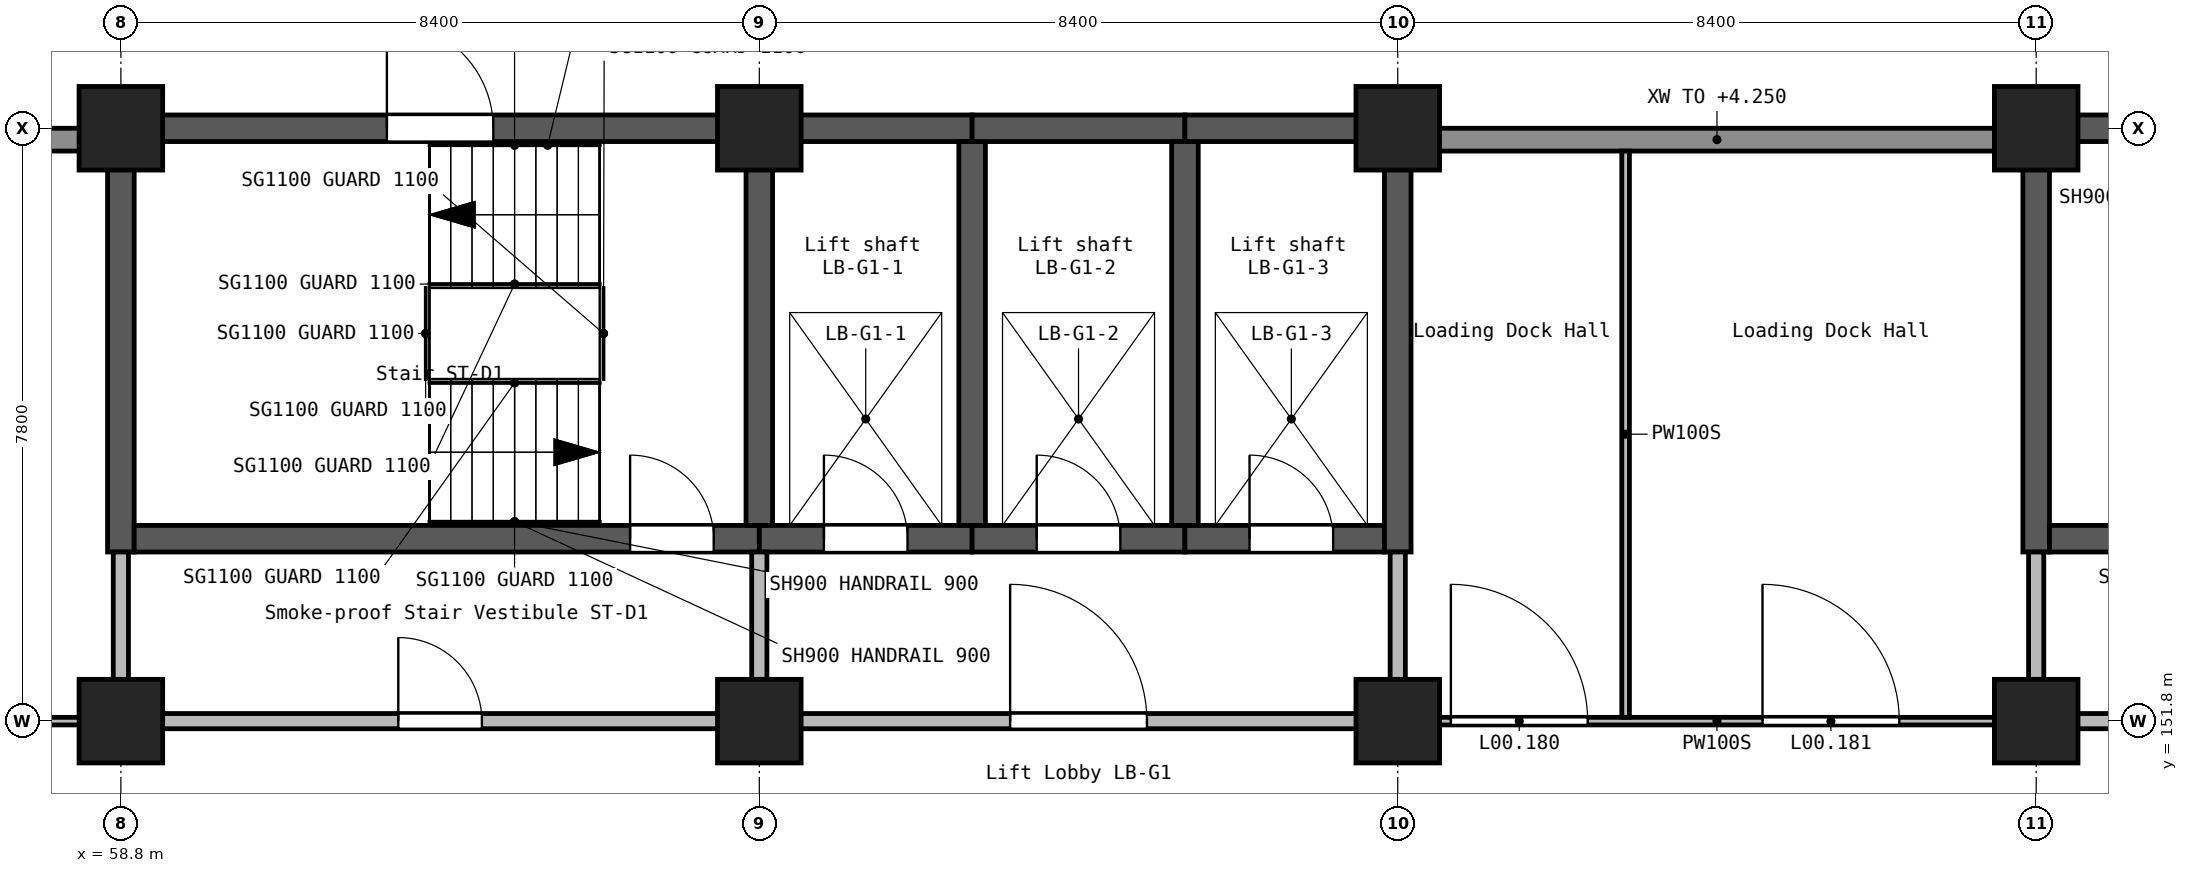
"""IFC4 building model, lengths in metres.
Left out: names, types, materials, properties, quantities, classifications, styles, units other than length and angle.
Written with IfcOpenShell. Run it as: python <this file> out.ifc"""

import sys

from ifc_helpers import new_model, si_unit, direction, frame, frame_2d, origin, origin_2d, place, context, subcontext, project, spatial, rectangle, extrude, element, fill, save


model = new_model("IFC4")
c1 = context("Model", 3, precision=1e-05, world=origin(), true_north=direction((0.0, 1.0)))
c2 = subcontext(c1, "Body", "Model", "MODEL_VIEW")
j1 = project(units=[si_unit("LENGTHUNIT", "METRE"), si_unit("PLANEANGLEUNIT", "RADIAN")], contexts=[c1])
p1 = place(None, origin())
s1 = spatial("IfcSite", under=j1, at=p1, CompositionType="ELEMENT")
p2 = place(p1, origin())
s2 = spatial("IfcBuilding", under=s1, at=p2, CompositionType="ELEMENT")
p3 = place(p2, origin())
s3 = spatial("IfcBuildingStorey", under=s2, at=p3, CompositionType="ELEMENT", Elevation=0.0)
for number, where, z_axis, x_axis in (
    (1, (58.8, 151.8, -0.3), (0.0, 0.0, 1.0), (1.0, 0.0, 0.0)),
    (2, (58.8, 159.6, -0.3), (0.0, 0.0, 1.0), (1.0, 0.0, 0.0)),
    (3, (67.2, 151.8, -0.3), (0.0, 0.0, 1.0), (1.0, 0.0, 0.0)),
    (4, (67.2, 159.6, -0.3), (0.0, 0.0, 1.0), (1.0, 0.0, 0.0)),
    (5, (75.6, 151.8, -0.3), (0.0, 0.0, 1.0), (1.0, 0.0, 0.0)),
    (6, (75.6, 159.6, -0.3), (0.0, 0.0, 1.0), (1.0, 0.0, 0.0)),
    (7, (84.0, 151.8, -0.3), (0.0, 0.0, 1.0), (1.0, 0.0, 0.0)),
    (8, (84.0, 159.6, -0.3), (0.0, 0.0, 1.0), (1.0, 0.0, 0.0)),
):
    element("IfcColumn", number, at=place(p3, frame(where, z_axis=z_axis, x_axis=x_axis)), inside=s3, PredefinedType="COLUMN", context=c2, shape_type="SweptSolid", body=[
        extrude(rectangle(XDim=1.1, YDim=1.1, at=origin_2d()), origin(), (0.0, 0.0, 1.0), 5.7),
    ])
p4 = place(p3, frame((58.625, 159.6, -0.3), z_axis=(0.0, 0.0, 1.0), x_axis=(1.0, 0.0, 0.0)))
e9 = element("IfcWall", 9, at=p4, inside=s3, PredefinedType="SHEAR", context=c2, shape_type="SweptSolid", body=[
    extrude(rectangle(XDim=8.575, YDim=0.35, at=frame_2d((4.288, 0.0))), origin(), (0.0, 0.0, 1.0), 5.7),
])
p5 = place(p4, frame((3.675, 0.0, 0.3)))
e10 = element("IfcOpeningElement", 10, at=p5, cuts=e9, PredefinedType="OPENING", context=c2, shape_type="SweptSolid", body=[
    extrude(rectangle(XDim=1.4, YDim=2.1, at=frame_2d((0.7, 1.05))), frame((0.0, 0.185, 0.0), z_axis=(0.0, -1.0, 0.0), x_axis=(1.0, 0.0, 0.0)), (0.0, 0.0, 1.0), 0.37),
])
p6 = place(p3, frame((58.8, 154.025, -0.3), z_axis=(0.0, 0.0, 1.0), x_axis=(0.0, 1.0, 0.0)))
e11 = element("IfcWall", 11, at=p6, inside=s3, PredefinedType="SHEAR", context=c2, shape_type="SweptSolid", body=[
    extrude(rectangle(XDim=5.4, YDim=0.35, at=frame_2d((2.7, 0.0))), origin(), (0.0, 0.0, 1.0), 5.7),
])
p7 = place(p3, frame((58.975, 154.2, -0.3), z_axis=(0.0, 0.0, 1.0), x_axis=(1.0, 0.0, 0.0)))
e12 = element("IfcWall", 12, at=p7, inside=s3, PredefinedType="SHEAR", context=c2, shape_type="SweptSolid", body=[
    extrude(rectangle(XDim=8.225, YDim=0.35, at=frame_2d((4.112, 0.0))), origin(), (0.0, 0.0, 1.0), 5.7),
])
p8 = place(p7, frame((6.525, 0.0, 0.3)))
e13 = element("IfcOpeningElement", 13, at=p8, cuts=e12, PredefinedType="OPENING", context=c2, shape_type="SweptSolid", body=[
    extrude(rectangle(XDim=1.1, YDim=2.1, at=frame_2d((0.55, 1.05))), frame((0.0, 0.185, 0.0), z_axis=(0.0, -1.0, 0.0), x_axis=(1.0, 0.0, 0.0)), (0.0, 0.0, 1.0), 0.37),
])
p9 = place(p3, frame((67.2, 154.2, -0.3), z_axis=(0.0, 0.0, 1.0), x_axis=(1.0, 0.0, 0.0)))
e14 = element("IfcWall", 14, at=p9, inside=s3, PredefinedType="SHEAR", context=c2, shape_type="SweptSolid", body=[
    extrude(rectangle(XDim=2.8, YDim=0.35, at=frame_2d((1.4, 0.0))), origin(), (0.0, 0.0, 1.0), 5.7),
])
p10 = place(p9, frame((0.85, 0.0, 0.3)))
e15 = element("IfcOpeningElement", 15, at=p10, cuts=e14, PredefinedType="OPENING", context=c2, shape_type="SweptSolid", body=[
    extrude(rectangle(XDim=1.1, YDim=2.1, at=frame_2d((0.55, 1.05))), frame((0.0, 0.185, 0.0), z_axis=(0.0, -1.0, 0.0), x_axis=(1.0, 0.0, 0.0)), (0.0, 0.0, 1.0), 0.37),
])
p11 = place(p3, frame((67.2, 154.375, -0.3), z_axis=(0.0, 0.0, 1.0), x_axis=(0.0, 1.0, 0.0)))
e16 = element("IfcWall", 16, at=p11, inside=s3, PredefinedType="SHEAR", context=c2, shape_type="SweptSolid", body=[
    extrude(rectangle(XDim=5.05, YDim=0.35, at=frame_2d((2.525, 0.0))), origin(), (0.0, 0.0, 1.0), 5.7),
])
p12 = place(p3, frame((67.2, 159.6, -0.3), z_axis=(0.0, 0.0, 1.0), x_axis=(1.0, 0.0, 0.0)))
e17 = element("IfcWall", 17, at=p12, inside=s3, PredefinedType="SHEAR", context=c2, shape_type="SweptSolid", body=[
    extrude(rectangle(XDim=2.8, YDim=0.35, at=frame_2d((1.4, 0.0))), origin(), (0.0, 0.0, 1.0), 5.7),
])
p13 = place(p3, frame((70.0, 154.2, -0.3), z_axis=(0.0, 0.0, 1.0), x_axis=(1.0, 0.0, 0.0)))
e18 = element("IfcWall", 18, at=p13, inside=s3, PredefinedType="SHEAR", context=c2, shape_type="SweptSolid", body=[
    extrude(rectangle(XDim=2.8, YDim=0.35, at=frame_2d((1.4, 0.0))), origin(), (0.0, 0.0, 1.0), 5.7),
])
p14 = place(p13, frame((0.85, 0.0, 0.3)))
e19 = element("IfcOpeningElement", 19, at=p14, cuts=e18, PredefinedType="OPENING", context=c2, shape_type="SweptSolid", body=[
    extrude(rectangle(XDim=1.1, YDim=2.1, at=frame_2d((0.55, 1.05))), frame((0.0, 0.185, 0.0), z_axis=(0.0, -1.0, 0.0), x_axis=(1.0, 0.0, 0.0)), (0.0, 0.0, 1.0), 0.37),
])
p15 = place(p3, frame((70.0, 154.375, -0.3), z_axis=(0.0, 0.0, 1.0), x_axis=(0.0, 1.0, 0.0)))
e20 = element("IfcWall", 20, at=p15, inside=s3, PredefinedType="SHEAR", context=c2, shape_type="SweptSolid", body=[
    extrude(rectangle(XDim=5.05, YDim=0.35, at=frame_2d((2.525, 0.0))), origin(), (0.0, 0.0, 1.0), 5.7),
])
p16 = place(p3, frame((70.0, 159.6, -0.3), z_axis=(0.0, 0.0, 1.0), x_axis=(1.0, 0.0, 0.0)))
e21 = element("IfcWall", 21, at=p16, inside=s3, PredefinedType="SHEAR", context=c2, shape_type="SweptSolid", body=[
    extrude(rectangle(XDim=2.8, YDim=0.35, at=frame_2d((1.4, 0.0))), origin(), (0.0, 0.0, 1.0), 5.7),
])
p17 = place(p3, frame((72.8, 154.2, -0.3), z_axis=(0.0, 0.0, 1.0), x_axis=(1.0, 0.0, 0.0)))
e22 = element("IfcWall", 22, at=p17, inside=s3, PredefinedType="SHEAR", context=c2, shape_type="SweptSolid", body=[
    extrude(rectangle(XDim=2.625, YDim=0.35, at=frame_2d((1.312, 0.0))), origin(), (0.0, 0.0, 1.0), 5.7),
])
p18 = place(p17, frame((0.85, 0.0, 0.3)))
e23 = element("IfcOpeningElement", 23, at=p18, cuts=e22, PredefinedType="OPENING", context=c2, shape_type="SweptSolid", body=[
    extrude(rectangle(XDim=1.1, YDim=2.1, at=frame_2d((0.55, 1.05))), frame((0.0, 0.185, 0.0), z_axis=(0.0, -1.0, 0.0), x_axis=(1.0, 0.0, 0.0)), (0.0, 0.0, 1.0), 0.37),
])
p19 = place(p3, frame((72.8, 154.375, -0.3), z_axis=(0.0, 0.0, 1.0), x_axis=(0.0, 1.0, 0.0)))
e24 = element("IfcWall", 24, at=p19, inside=s3, PredefinedType="SHEAR", context=c2, shape_type="SweptSolid", body=[
    extrude(rectangle(XDim=5.05, YDim=0.35, at=frame_2d((2.525, 0.0))), origin(), (0.0, 0.0, 1.0), 5.7),
])
p20 = place(p3, frame((72.8, 159.6, -0.3), z_axis=(0.0, 0.0, 1.0), x_axis=(1.0, 0.0, 0.0)))
e25 = element("IfcWall", 25, at=p20, inside=s3, PredefinedType="SHEAR", context=c2, shape_type="SweptSolid", body=[
    extrude(rectangle(XDim=2.625, YDim=0.35, at=frame_2d((1.312, 0.0))), origin(), (0.0, 0.0, 1.0), 5.7),
])
p21 = place(p3, frame((75.6, 154.025, -0.3), z_axis=(0.0, 0.0, 1.0), x_axis=(0.0, 1.0, 0.0)))
e26 = element("IfcWall", 26, at=p21, inside=s3, PredefinedType="SHEAR", context=c2, shape_type="SweptSolid", body=[
    extrude(rectangle(XDim=5.75, YDim=0.35, at=frame_2d((2.875, 0.0))), origin(), (0.0, 0.0, 1.0), 5.7),
])
p22 = place(p3, frame((83.825, 159.6, -0.3), z_axis=(0.0, 0.0, 1.0), x_axis=(1.0, 0.0, 0.0)))
e27 = element("IfcWall", 27, at=p22, inside=s3, PredefinedType="SHEAR", context=c2, shape_type="SweptSolid", body=[
    extrude(rectangle(XDim=8.4, YDim=0.35, at=frame_2d((4.2, 0.0))), origin(), (0.0, 0.0, 1.0), 5.7),
])
p23 = place(p22, frame((3.675, 0.0, 0.3)))
e28 = element("IfcOpeningElement", 28, at=p23, cuts=e27, PredefinedType="OPENING", context=c2, shape_type="SweptSolid", body=[
    extrude(rectangle(XDim=1.4, YDim=2.1, at=frame_2d((0.7, 1.05))), frame((0.0, 0.185, 0.0), z_axis=(0.0, -1.0, 0.0), x_axis=(1.0, 0.0, 0.0)), (0.0, 0.0, 1.0), 0.37),
])
p24 = place(p3, frame((84.0, 154.025, -0.3), z_axis=(0.0, 0.0, 1.0), x_axis=(0.0, 1.0, 0.0)))
e29 = element("IfcWall", 29, at=p24, inside=s3, PredefinedType="SHEAR", context=c2, shape_type="SweptSolid", body=[
    extrude(rectangle(XDim=5.4, YDim=0.35, at=frame_2d((2.7, 0.0))), origin(), (0.0, 0.0, 1.0), 5.7),
])
p25 = place(p3, frame((84.175, 154.2, -0.3), z_axis=(0.0, 0.0, 1.0), x_axis=(1.0, 0.0, 0.0)))
e30 = element("IfcWall", 30, at=p25, inside=s3, PredefinedType="SHEAR", context=c2, shape_type="SweptSolid", body=[
    extrude(rectangle(XDim=8.05, YDim=0.35, at=frame_2d((4.025, 0.0))), origin(), (0.0, 0.0, 1.0), 5.7),
])
p26 = place(p25, frame((6.525, 0.0, 0.3)))
e31 = element("IfcOpeningElement", 31, at=p26, cuts=e30, PredefinedType="OPENING", context=c2, shape_type="SweptSolid", body=[
    extrude(rectangle(XDim=1.1, YDim=2.1, at=frame_2d((0.55, 1.05))), frame((0.0, 0.185, 0.0), z_axis=(0.0, -1.0, 0.0), x_axis=(1.0, 0.0, 0.0)), (0.0, 0.0, 1.0), 0.37),
])
p27 = place(p3, frame((83.5, 159.45, 0.0), z_axis=(0.0, 0.0, 1.0), x_axis=(-1.0, 0.0, 0.0)))
e32 = element("IfcWall", 32, at=p27, inside=s3, PredefinedType="STANDARD", context=c2, shape_type="SweptSolid", body=[
    extrude(rectangle(XDim=7.4, YDim=0.3, at=frame_2d((3.7, 0.0))), origin(), (0.0, 0.0, 1.0), 4.25),
])
p28 = place(p3, frame((58.3, 159.45, 0.0), z_axis=(0.0, 0.0, 1.0), x_axis=(-1.0, 0.0, 0.0)))
e33 = element("IfcWall", 33, at=p28, inside=s3, PredefinedType="STANDARD", context=c2, shape_type="SweptSolid", body=[
    extrude(rectangle(XDim=7.4, YDim=0.3, at=frame_2d((3.7, 0.0))), origin(), (0.0, 0.0, 1.0), 4.25),
])
p29 = place(p3, frame((59.3, 151.8, 0.0), z_axis=(0.0, 0.0, 1.0), x_axis=(1.0, 0.0, 0.0)))
e34 = element("IfcWall", 34, at=p29, inside=s3, PredefinedType="SOLIDWALL", context=c2, shape_type="SweptSolid", body=[
    extrude(rectangle(XDim=7.4, YDim=0.2, at=frame_2d((3.7, 0.0))), origin(), (0.0, 0.0, 1.0), 5.05),
])
p30 = place(p29, frame((3.15, 0.0, 0.0)))
e35 = element("IfcOpeningElement", 35, at=p30, cuts=e34, PredefinedType="OPENING", context=c2, shape_type="SweptSolid", body=[
    extrude(rectangle(XDim=1.1, YDim=2.1, at=frame_2d((0.55, 1.05))), frame((0.0, 0.11, 0.0), z_axis=(0.0, -1.0, 0.0), x_axis=(1.0, 0.0, 0.0)), (0.0, 0.0, 1.0), 0.22),
])
p31 = place(p3, frame((67.7, 151.8, 0.0), z_axis=(0.0, 0.0, 1.0), x_axis=(1.0, 0.0, 0.0)))
e36 = element("IfcWall", 36, at=p31, inside=s3, PredefinedType="SOLIDWALL", context=c2, shape_type="SweptSolid", body=[
    extrude(rectangle(XDim=7.4, YDim=0.2, at=frame_2d((3.7, 0.0))), origin(), (0.0, 0.0, 1.0), 5.05),
])
p32 = place(p31, frame((2.8, 0.0, 0.0)))
e37 = element("IfcOpeningElement", 37, at=p32, cuts=e36, PredefinedType="OPENING", context=c2, shape_type="SweptSolid", body=[
    extrude(rectangle(XDim=1.8, YDim=2.1, at=frame_2d((0.9, 1.05))), frame((0.0, 0.11, 0.0), z_axis=(0.0, -1.0, 0.0), x_axis=(1.0, 0.0, 0.0)), (0.0, 0.0, 1.0), 0.22),
])
p33 = place(p3, frame((84.5, 151.8, 0.0), z_axis=(0.0, 0.0, 1.0), x_axis=(1.0, 0.0, 0.0)))
e38 = element("IfcWall", 38, at=p33, inside=s3, PredefinedType="SOLIDWALL", context=c2, shape_type="SweptSolid", body=[
    extrude(rectangle(XDim=7.4, YDim=0.2, at=frame_2d((3.7, 0.0))), origin(), (0.0, 0.0, 1.0), 5.05),
])
p34 = place(p33, frame((3.15, 0.0, 0.0)))
e39 = element("IfcOpeningElement", 39, at=p34, cuts=e38, PredefinedType="OPENING", context=c2, shape_type="SweptSolid", body=[
    extrude(rectangle(XDim=1.1, YDim=2.1, at=frame_2d((0.55, 1.05))), frame((0.0, 0.11, 0.0), z_axis=(0.0, -1.0, 0.0), x_axis=(1.0, 0.0, 0.0)), (0.0, 0.0, 1.0), 0.22),
])
for number, where, z_axis, x_axis in (
    (40, (58.8, 152.3, 0.0), (0.0, 0.0, 1.0), (0.0, 1.0, 0.0)),
    (41, (67.2, 152.3, 0.0), (0.0, 0.0, 1.0), (0.0, 1.0, 0.0)),
    (42, (75.6, 152.3, 0.0), (0.0, 0.0, 1.0), (0.0, 1.0, 0.0)),
    (43, (84.0, 152.3, 0.0), (0.0, 0.0, 1.0), (0.0, 1.0, 0.0)),
):
    element("IfcWall", number, at=place(p3, frame(where, z_axis=z_axis, x_axis=x_axis)), inside=s3, PredefinedType="SOLIDWALL", context=c2, shape_type="SweptSolid", body=[
        extrude(rectangle(XDim=1.725, YDim=0.2, at=frame_2d((0.862, 0.0))), origin(), (0.0, 0.0, 1.0), 5.05),
    ])
p35 = place(p3, frame((76.1, 151.8, 0.0), z_axis=(0.0, 0.0, 1.0), x_axis=(1.0, 0.0, 0.0)))
e44 = element("IfcWall", 44, at=p35, inside=s3, PredefinedType="PARTITIONING", context=c2, shape_type="SweptSolid", body=[
    extrude(rectangle(XDim=7.4, YDim=0.1, at=frame_2d((3.7, 0.0))), origin(), (0.0, 0.0, 1.0), 5.05),
])
p36 = place(p35, frame((0.199, 0.0, 0.0)))
e45 = element("IfcOpeningElement", 45, at=p36, cuts=e44, PredefinedType="OPENING", context=c2, shape_type="SweptSolid", body=[
    extrude(rectangle(XDim=1.8, YDim=2.1, at=frame_2d((0.9, 1.05))), frame((0.0, 0.06, 0.0), z_axis=(0.0, -1.0, 0.0), x_axis=(1.0, 0.0, 0.0)), (0.0, 0.0, 1.0), 0.12),
])
p37 = place(p35, frame((4.299, 0.0, 0.0)))
e46 = element("IfcOpeningElement", 46, at=p37, cuts=e44, PredefinedType="OPENING", context=c2, shape_type="SweptSolid", body=[
    extrude(rectangle(XDim=1.8, YDim=2.1, at=frame_2d((0.9, 1.05))), frame((0.0, 0.06, 0.0), z_axis=(0.0, -1.0, 0.0), x_axis=(1.0, 0.0, 0.0)), (0.0, 0.0, 1.0), 0.12),
])
p38 = place(p3, frame((50.9, 151.8, 0.0), z_axis=(0.0, 0.0, 1.0), x_axis=(1.0, 0.0, 0.0)))
e47 = element("IfcWall", 47, at=p38, inside=s3, PredefinedType="PARTITIONING", context=c2, shape_type="SweptSolid", body=[
    extrude(rectangle(XDim=7.4, YDim=0.1, at=frame_2d((3.7, 0.0))), origin(), (0.0, 0.0, 1.0), 5.05),
])
p39 = place(p38, frame((0.549, 0.0, 0.0)))
e48 = element("IfcOpeningElement", 48, at=p39, cuts=e47, PredefinedType="OPENING", context=c2, shape_type="SweptSolid", body=[
    extrude(rectangle(XDim=0.9, YDim=2.1, at=frame_2d((0.45, 1.05))), frame((0.0, 0.06, 0.0), z_axis=(0.0, -1.0, 0.0), x_axis=(1.0, 0.0, 0.0)), (0.0, 0.0, 1.0), 0.12),
])
p40 = place(p38, frame((4.749, 0.0, 0.0)))
e49 = element("IfcOpeningElement", 49, at=p40, cuts=e47, PredefinedType="OPENING", context=c2, shape_type="SweptSolid", body=[
    extrude(rectangle(XDim=0.9, YDim=2.1, at=frame_2d((0.45, 1.05))), frame((0.0, 0.06, 0.0), z_axis=(0.0, -1.0, 0.0), x_axis=(1.0, 0.0, 0.0)), (0.0, 0.0, 1.0), 0.12),
])
p41 = place(p3, frame((78.598, 151.85, 0.0), z_axis=(0.0, 0.0, 1.0), x_axis=(0.0, 1.0, 0.0)))
e50 = element("IfcWall", 50, at=p41, inside=s3, PredefinedType="PARTITIONING", context=c2, shape_type="SweptSolid", body=[
    extrude(rectangle(XDim=7.45, YDim=0.1, at=frame_2d((3.725, 0.0))), origin(), (0.0, 0.0, 1.0), 5.05),
])
p42 = place(p5, origin())
e51 = element("IfcDoor", 51, at=p42, inside=s3, OperationType="SINGLE_SWING_LEFT", PredefinedType="DOOR", context=c2, shape_type="SweptSolid", body=[
    extrude(rectangle(XDim=1.4, YDim=2.1, at=frame_2d((0.7, 1.05))), frame((0.0, 0.025, 0.0), z_axis=(0.0, -1.0, 0.0), x_axis=(1.0, 0.0, 0.0)), (0.0, 0.0, 1.0), 0.05),
])
fill(e10, e51)
p43 = place(p10, origin())
e52 = element("IfcDoor", 52, at=p43, inside=s3, OperationType="DOUBLE_DOOR_SLIDING", PredefinedType="DOOR", context=c2, shape_type="SweptSolid", body=[
    extrude(rectangle(XDim=1.1, YDim=2.1, at=frame_2d((0.55, 1.05))), frame((0.0, 0.025, 0.0), z_axis=(0.0, -1.0, 0.0), x_axis=(1.0, 0.0, 0.0)), (0.0, 0.0, 1.0), 0.05),
])
fill(e15, e52)
p44 = place(p14, origin())
e53 = element("IfcDoor", 53, at=p44, inside=s3, OperationType="DOUBLE_DOOR_SLIDING", PredefinedType="DOOR", context=c2, shape_type="SweptSolid", body=[
    extrude(rectangle(XDim=1.1, YDim=2.1, at=frame_2d((0.55, 1.05))), frame((0.0, 0.025, 0.0), z_axis=(0.0, -1.0, 0.0), x_axis=(1.0, 0.0, 0.0)), (0.0, 0.0, 1.0), 0.05),
])
fill(e19, e53)
p45 = place(p18, origin())
e54 = element("IfcDoor", 54, at=p45, inside=s3, OperationType="DOUBLE_DOOR_SLIDING", PredefinedType="DOOR", context=c2, shape_type="SweptSolid", body=[
    extrude(rectangle(XDim=1.1, YDim=2.1, at=frame_2d((0.55, 1.05))), frame((0.0, 0.025, 0.0), z_axis=(0.0, -1.0, 0.0), x_axis=(1.0, 0.0, 0.0)), (0.0, 0.0, 1.0), 0.05),
])
fill(e23, e54)
p46 = place(p8, origin())
e55 = element("IfcDoor", 55, at=p46, inside=s3, OperationType="SINGLE_SWING_RIGHT", PredefinedType="DOOR", context=c2, shape_type="SweptSolid", body=[
    extrude(rectangle(XDim=1.1, YDim=2.1, at=frame_2d((0.55, 1.05))), frame((0.0, 0.025, 0.0), z_axis=(0.0, -1.0, 0.0), x_axis=(1.0, 0.0, 0.0)), (0.0, 0.0, 1.0), 0.05),
])
fill(e13, e55)
p47 = place(p30, origin())
e56 = element("IfcDoor", 56, at=p47, inside=s3, OperationType="SINGLE_SWING_RIGHT", PredefinedType="DOOR", context=c2, shape_type="SweptSolid", body=[
    extrude(rectangle(XDim=1.1, YDim=2.1, at=frame_2d((0.55, 1.05))), frame((0.0, 0.025, 0.0), z_axis=(0.0, -1.0, 0.0), x_axis=(1.0, 0.0, 0.0)), (0.0, 0.0, 1.0), 0.05),
])
fill(e35, e56)
p48 = place(p32, origin())
e57 = element("IfcDoor", 57, at=p48, inside=s3, OperationType="DOUBLE_DOOR_SINGLE_SWING", PredefinedType="DOOR", context=c2, shape_type="SweptSolid", body=[
    extrude(rectangle(XDim=1.8, YDim=2.1, at=frame_2d((0.9, 1.05))), frame((0.0, 0.025, 0.0), z_axis=(0.0, -1.0, 0.0), x_axis=(1.0, 0.0, 0.0)), (0.0, 0.0, 1.0), 0.05),
])
fill(e37, e57)
p49 = place(p36, origin())
e58 = element("IfcDoor", 58, at=p49, inside=s3, OperationType="DOUBLE_DOOR_SINGLE_SWING", PredefinedType="DOOR", context=c2, shape_type="SweptSolid", body=[
    extrude(rectangle(XDim=1.8, YDim=2.1, at=frame_2d((0.9, 1.05))), frame((0.0, 0.025, 0.0), z_axis=(0.0, -1.0, 0.0), x_axis=(1.0, 0.0, 0.0)), (0.0, 0.0, 1.0), 0.05),
])
fill(e45, e58)
p50 = place(p37, origin())
e59 = element("IfcDoor", 59, at=p50, inside=s3, OperationType="DOUBLE_DOOR_SINGLE_SWING", PredefinedType="DOOR", context=c2, shape_type="SweptSolid", body=[
    extrude(rectangle(XDim=1.8, YDim=2.1, at=frame_2d((0.9, 1.05))), frame((0.0, 0.025, 0.0), z_axis=(0.0, -1.0, 0.0), x_axis=(1.0, 0.0, 0.0)), (0.0, 0.0, 1.0), 0.05),
])
fill(e46, e59)
save(model, sys.argv[1])
